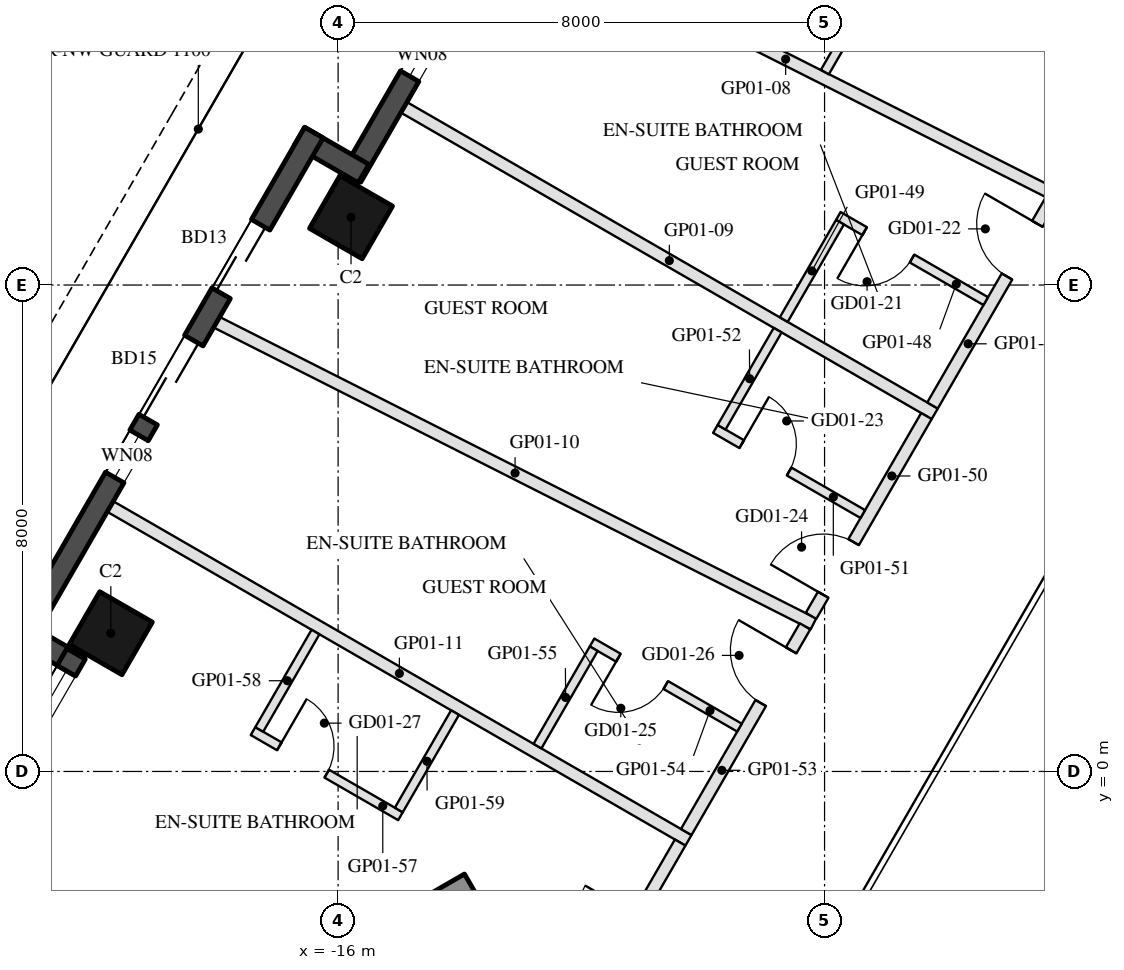
"""IFC4 building model, lengths in metres.
Left out: names, types, materials, properties, quantities, classifications, styles, units other than length and angle.
Written with IfcOpenShell. Run it as: python <this file> out.ifc"""

import sys

from ifc_helpers import new_model, si_unit, direction, frame, frame_2d, origin, origin_2d, place, context, subcontext, project, spatial, rectangle, hollow_rectangle, extrude, element, fill, save


model = new_model("IFC4")
c1 = context("Model", 3, precision=1e-05, world=origin(), true_north=direction((0.0, 1.0)))
c2 = subcontext(c1, "Body", "Model", "MODEL_VIEW")
j1 = project(units=[si_unit("LENGTHUNIT", "METRE"), si_unit("PLANEANGLEUNIT", "RADIAN")], contexts=[c1])
p1 = place(None, origin())
s1 = spatial("IfcSite", under=j1, at=p1, CompositionType="ELEMENT")
p2 = place(p1, origin())
s2 = spatial("IfcBuilding", under=s1, at=p2, CompositionType="ELEMENT")
p3 = place(p2, frame((0.0, 0.0, 46.5)))
s3 = spatial("IfcBuildingStorey", under=s2, at=p3, CompositionType="ELEMENT", Elevation=46.5)
for number, where, z_axis, x_axis in (
    (1, (-15.788, 9.115, 0.0), (0.0, 0.0, 1.0), (0.5, 0.866, 0.0)),
    (2, (-19.738, 2.273, 0.0), (0.0, 0.0, 1.0), (0.5, 0.866, 0.0)),
):
    element("IfcColumn", number, at=place(p3, frame(where, z_axis=z_axis, x_axis=x_axis)), inside=s3, PredefinedType="COLUMN", context=c2, shape_type="SweptSolid", body=[
        extrude(hollow_rectangle(XDim=1.0, YDim=1.0, WallThickness=0.045, at=origin_2d()), origin(), (0.0, 0.0, 1.0), 3.7),
    ])
p4 = place(p3, frame((-12.409, 15.617, 0.0), z_axis=(0.0, 0.0, 1.0), x_axis=(-0.500003597184, -0.866023326939, 0.0)))
e3 = element("IfcWall", 3, at=p4, inside=s3, PredefinedType="SOLIDWALL", context=c2, shape_type="SweptSolid", body=[
    extrude(rectangle(XDim=6.74, YDim=0.35, at=frame_2d((3.37, 0.0))), origin(), (0.0, 0.0, 1.0), 3.55),
])
p5 = place(p4, frame((0.32, 0.0, 0.3)))
e4 = element("IfcOpeningElement", 4, at=p5, cuts=e3, PredefinedType="OPENING", context=c2, shape_type="SweptSolid", body=[
    extrude(rectangle(XDim=1.0, YDim=2.65, at=frame_2d((0.5, 1.325))), frame((0.0, 0.185, 0.0), z_axis=(0.0, -1.0, 0.0), x_axis=(1.0, 0.0, 0.0)), (0.0, 0.0, 1.0), 0.37),
])
p6 = place(p4, frame((2.229, 0.0, 0.0)))
e5 = element("IfcOpeningElement", 5, at=p6, cuts=e3, PredefinedType="OPENING", context=c2, shape_type="SweptSolid", body=[
    extrude(rectangle(XDim=1.5, YDim=2.4, at=frame_2d((0.75, 1.2))), frame((0.0, 0.185, 0.0), z_axis=(0.0, -1.0, 0.0), x_axis=(1.0, 0.0, 0.0)), (0.0, 0.0, 1.0), 0.37),
])
p7 = place(p4, frame((4.029, 0.0, 0.3)))
e6 = element("IfcOpeningElement", 6, at=p7, cuts=e3, PredefinedType="OPENING", context=c2, shape_type="SweptSolid", body=[
    extrude(rectangle(XDim=0.8, YDim=2.65, at=frame_2d((0.4, 1.325))), frame((0.0, 0.185, 0.0), z_axis=(0.0, -1.0, 0.0), x_axis=(1.0, 0.0, 0.0)), (0.0, 0.0, 1.0), 0.37),
])
p8 = place(p3, frame((-15.581, 9.833, 0.0), z_axis=(0.0, 0.0, 1.0), x_axis=(-0.866055662726, 0.499947586314, 0.0)))
e7 = element("IfcWall", 7, at=p8, inside=s3, PredefinedType="SOLIDWALL", context=c2, shape_type="SweptSolid", body=[
    extrude(rectangle(XDim=1.22, YDim=0.35, at=frame_2d((0.61, 0.0))), origin(), (0.0, 0.0, 1.0), 3.55),
])
p9 = place(p3, frame((-16.398, 10.507, 0.0), z_axis=(0.0, 0.0, 1.0), x_axis=(-0.499999142773, -0.866025898704, 0.0)))
e8 = element("IfcWall", 8, at=p9, inside=s3, PredefinedType="SOLIDWALL", context=c2, shape_type="SweptSolid", body=[
    extrude(rectangle(XDim=9.7, YDim=0.35, at=frame_2d((4.85, 0.0))), origin(), (0.0, 0.0, 1.0), 3.55),
])
p10 = place(p9, frame((1.75, 0.0, 0.0)))
e9 = element("IfcOpeningElement", 9, at=p10, cuts=e8, PredefinedType="OPENING", context=c2, shape_type="SweptSolid", body=[
    extrude(rectangle(XDim=1.3, YDim=2.4, at=frame_2d((0.65, 1.2))), frame((0.0, 0.185, 0.0), z_axis=(0.0, -1.0, 0.0), x_axis=(1.0, 0.0, 0.0)), (0.0, 0.0, 1.0), 0.37),
])
p11 = place(p9, frame((3.95, 0.0, 0.0)))
e10 = element("IfcOpeningElement", 10, at=p11, cuts=e8, PredefinedType="OPENING", context=c2, shape_type="SweptSolid", body=[
    extrude(rectangle(XDim=1.5, YDim=2.4, at=frame_2d((0.75, 1.2))), frame((0.0, 0.185, 0.0), z_axis=(0.0, -1.0, 0.0), x_axis=(1.0, 0.0, 0.0)), (0.0, 0.0, 1.0), 0.37),
])
p12 = place(p9, frame((5.75, 0.0, 0.3)))
e11 = element("IfcOpeningElement", 11, at=p12, cuts=e8, PredefinedType="OPENING", context=c2, shape_type="SweptSolid", body=[
    extrude(rectangle(XDim=0.8, YDim=2.65, at=frame_2d((0.4, 1.325))), frame((0.0, 0.185, 0.0), z_axis=(0.0, -1.0, 0.0), x_axis=(1.0, 0.0, 0.0)), (0.0, 0.0, 1.0), 0.37),
])
p13 = place(p3, frame((-21.312, 2.346, 0.0), z_axis=(0.0, 0.0, 1.0), x_axis=(0.866005645448, -0.500034220881, 0.0)))
e12 = element("IfcWall", 12, at=p13, inside=s3, PredefinedType="SOLIDWALL", context=c2, shape_type="SweptSolid", body=[
    extrude(rectangle(XDim=1.22, YDim=0.35, at=frame_2d((0.61, 0.0))), origin(), (0.0, 0.0, 1.0), 3.55),
])
p14 = place(p3, frame((-20.309, 1.934, 0.0), z_axis=(0.0, 0.0, 1.0), x_axis=(-0.499992114976, -0.866029956157, 0.0)))
e13 = element("IfcWall", 13, at=p14, inside=s3, PredefinedType="SOLIDWALL", context=c2, shape_type="SweptSolid", body=[
    extrude(rectangle(XDim=6.74, YDim=0.35, at=frame_2d((3.37, 0.0))), origin(), (0.0, 0.0, 1.0), 3.55),
])
p15 = place(p14, frame((4.02, 0.0, 0.0)))
e14 = element("IfcOpeningElement", 14, at=p15, cuts=e13, PredefinedType="OPENING", context=c2, shape_type="SweptSolid", body=[
    extrude(rectangle(XDim=2.4, YDim=2.4, at=frame_2d((1.2, 1.2))), frame((0.0, 0.185, 0.0), z_axis=(0.0, -1.0, 0.0), x_axis=(1.0, 0.0, 0.0)), (0.0, 0.0, 1.0), 0.37),
])
p16 = place(p14, frame((0.32, 0.0, 0.3)))
e15 = element("IfcOpeningElement", 15, at=p16, cuts=e13, PredefinedType="OPENING", context=c2, shape_type="SweptSolid", body=[
    extrude(rectangle(XDim=1.5, YDim=2.65, at=frame_2d((0.75, 1.325))), frame((0.0, 0.185, 0.0), z_axis=(0.0, -1.0, 0.0), x_axis=(1.0, 0.0, 0.0)), (0.0, 0.0, 1.0), 0.37),
])
p17 = place(p14, frame((2.12, 0.0, 0.3)))
e16 = element("IfcOpeningElement", 16, at=p17, cuts=e13, PredefinedType="OPENING", context=c2, shape_type="SweptSolid", body=[
    extrude(rectangle(XDim=1.5, YDim=2.65, at=frame_2d((0.75, 1.325))), frame((0.0, 0.185, 0.0), z_axis=(0.0, -1.0, 0.0), x_axis=(1.0, 0.0, 0.0)), (0.0, 0.0, 1.0), 0.37),
])
p18 = place(p3, frame((-13.797, -1.903, 0.0), z_axis=(0.0, 0.0, 1.0), x_axis=(-0.866025009528, -0.500000682871, 0.0)))
e17 = element("IfcWall", 17, at=p18, inside=s3, PredefinedType="SHEAR", context=c2, shape_type="SweptSolid", body=[
    extrude(rectangle(XDim=14.837, YDim=0.5, at=frame_2d((7.418, 0.0))), origin(), (0.0, 0.0, 1.0), 3.5),
])
p19 = place(p3, frame((-13.147, 13.989, 0.0), z_axis=(0.0, 0.0, 1.0), x_axis=(0.892898572595, -0.450257858408, 0.0)))
e18 = element("IfcWall", 18, at=p19, inside=s3, PredefinedType="PARTITIONING", context=c2, shape_type="SweptSolid", body=[
    extrude(rectangle(XDim=10.096, YDim=0.2, at=frame_2d((5.048, 0.0))), origin(), (0.0, 0.0, 1.0), 2.96),
])
p20 = place(p3, frame((-14.917, 10.922, 0.0), z_axis=(0.0, 0.0, 1.0), x_axis=(0.866022637375, -0.500004791531, 0.0)))
e19 = element("IfcWall", 19, at=p20, inside=s3, PredefinedType="PARTITIONING", context=c2, shape_type="SweptSolid", body=[
    extrude(rectangle(XDim=10.08, YDim=0.2, at=frame_2d((5.04, 0.0))), origin(), (0.0, 0.0, 1.0), 2.96),
])
p21 = place(p3, frame((-17.997, 7.388, 0.0), z_axis=(0.0, 0.0, 1.0), x_axis=(0.892478457214, -0.451090016968, 0.0)))
e20 = element("IfcWall", 20, at=p21, inside=s3, PredefinedType="PARTITIONING", context=c2, shape_type="SweptSolid", body=[
    extrude(rectangle(XDim=10.997, YDim=0.2, at=frame_2d((5.499, 0.0))), origin(), (0.0, 0.0, 1.0), 2.96),
])
p22 = place(p3, frame((-19.747, 4.357, 0.0), z_axis=(0.0, 0.0, 1.0), x_axis=(0.866027479907, -0.499996404033, 0.0)))
e21 = element("IfcWall", 21, at=p22, inside=s3, PredefinedType="PARTITIONING", context=c2, shape_type="SweptSolid", body=[
    extrude(rectangle(XDim=10.98, YDim=0.2, at=frame_2d((5.49, 0.0))), origin(), (0.0, 0.0, 1.0), 2.96),
])
p23 = place(p3, frame((-7.068, 13.108, 0.0), z_axis=(0.0, 0.0, 1.0), x_axis=(-0.4999770169, -0.866038672677, 0.0)))
e22 = element("IfcWall", 22, at=p23, inside=s3, PredefinedType="PARTITIONING", context=c2, shape_type="SweptSolid", body=[
    extrude(rectangle(XDim=1.854, YDim=0.15, at=frame_2d((0.927, 0.0))), origin(), (0.0, 0.0, 1.0), 2.95),
])
p24 = place(p3, frame((-6.225, 6.019, 0.0), z_axis=(0.0, 0.0, 1.0), x_axis=(0.499998439657, 0.866026304647, 0.0)))
e23 = element("IfcWall", 23, at=p24, inside=s3, PredefinedType="PARTITIONING", context=c2, shape_type="SweptSolid", body=[
    extrude(rectangle(XDim=3.905, YDim=0.2, at=frame_2d((1.953, 0.0))), origin(), (0.0, 0.0, 1.0), 2.95),
])
p25 = place(p24, frame((2.45, 0.0, 0.0)))
e24 = element("IfcOpeningElement", 24, at=p25, cuts=e23, PredefinedType="OPENING", context=c2, shape_type="SweptSolid", body=[
    extrude(rectangle(XDim=1.0, YDim=2.1, at=frame_2d((0.5, 1.05))), frame((0.0, 0.11, 0.0), z_axis=(0.0, -1.0, 0.0), x_axis=(1.0, 0.0, 0.0)), (0.0, 0.0, 1.0), 0.22),
])
p26 = place(p3, frame((-5.349, 7.736, 0.0), z_axis=(0.0, 0.0, 1.0), x_axis=(-0.866056369097, 0.49994636267, 0.0)))
e25 = element("IfcWall", 25, at=p26, inside=s3, PredefinedType="PARTITIONING", context=c2, shape_type="SweptSolid", body=[
    extrude(rectangle(XDim=2.8, YDim=0.15, at=frame_2d((1.4, 0.0))), origin(), (0.0, 0.0, 1.0), 2.95),
])
p27 = place(p26, frame((1.4, 0.0, 0.0)))
e26 = element("IfcOpeningElement", 26, at=p27, cuts=e25, PredefinedType="OPENING", context=c2, shape_type="SweptSolid", body=[
    extrude(rectangle(XDim=0.9, YDim=2.1, at=frame_2d((0.45, 1.05))), frame((0.0, 0.085, 0.0), z_axis=(0.0, -1.0, 0.0), x_axis=(1.0, 0.0, 0.0)), (0.0, 0.0, 1.0), 0.17),
])
p28 = place(p3, frame((-7.746, 9.033, 0.0), z_axis=(0.0, 0.0, 1.0), x_axis=(-0.500042316284, -0.866000971088, 0.0)))
e27 = element("IfcWall", 27, at=p28, inside=s3, PredefinedType="PARTITIONING", context=c2, shape_type="SweptSolid", body=[
    extrude(rectangle(XDim=1.85, YDim=0.15, at=frame_2d((0.925, 0.0))), origin(), (0.0, 0.0, 1.0), 2.95),
])
p29 = place(p3, frame((-8.222, 2.56, 0.0), z_axis=(0.0, 0.0, 1.0), x_axis=(0.499973105789, 0.866040930607, 0.0)))
e28 = element("IfcWall", 28, at=p29, inside=s3, PredefinedType="PARTITIONING", context=c2, shape_type="SweptSolid", body=[
    extrude(rectangle(XDim=3.794, YDim=0.2, at=frame_2d((1.897, 0.0))), origin(), (0.0, 0.0, 1.0), 2.95),
])
p30 = place(p29, frame((0.4, 0.0, 0.0)))
e29 = element("IfcOpeningElement", 29, at=p30, cuts=e28, PredefinedType="OPENING", context=c2, shape_type="SweptSolid", body=[
    extrude(rectangle(XDim=1.0, YDim=2.1, at=frame_2d((0.5, 1.05))), frame((0.0, 0.11, 0.0), z_axis=(0.0, -1.0, 0.0), x_axis=(1.0, 0.0, 0.0)), (0.0, 0.0, 1.0), 0.22),
])
p31 = place(p3, frame((-9.796, 5.633, 0.0), z_axis=(0.0, 0.0, 1.0), x_axis=(0.866034573852, -0.49998411664, 0.0)))
e30 = element("IfcWall", 30, at=p31, inside=s3, PredefinedType="PARTITIONING", context=c2, shape_type="SweptSolid", body=[
    extrude(rectangle(XDim=2.8, YDim=0.15, at=frame_2d((1.4, 0.0))), origin(), (0.0, 0.0, 1.0), 2.95),
])
p32 = place(p31, frame((0.5, 0.0, 0.0)))
e31 = element("IfcOpeningElement", 31, at=p32, cuts=e30, PredefinedType="OPENING", context=c2, shape_type="SweptSolid", body=[
    extrude(rectangle(XDim=0.9, YDim=2.1, at=frame_2d((0.45, 1.05))), frame((0.0, 0.085, 0.0), z_axis=(0.0, -1.0, 0.0), x_axis=(1.0, 0.0, 0.0)), (0.0, 0.0, 1.0), 0.17),
])
p33 = place(p3, frame((-8.771, 7.258, 0.0), z_axis=(0.0, 0.0, 1.0), x_axis=(-0.500154078321, -0.865936428347, 0.0)))
e32 = element("IfcWall", 32, at=p33, inside=s3, PredefinedType="PARTITIONING", context=c2, shape_type="SweptSolid", body=[
    extrude(rectangle(XDim=1.844, YDim=0.15, at=frame_2d((0.922, 0.0))), origin(), (0.0, 0.0, 1.0), 2.95),
])
p34 = place(p3, frame((-10.275, -0.996, 0.0), z_axis=(0.0, 0.0, 1.0), x_axis=(0.499998439657, 0.866026304647, 0.0)))
e33 = element("IfcWall", 33, at=p34, inside=s3, PredefinedType="PARTITIONING", context=c2, shape_type="SweptSolid", body=[
    extrude(rectangle(XDim=3.905, YDim=0.2, at=frame_2d((1.953, 0.0))), origin(), (0.0, 0.0, 1.0), 2.95),
])
p35 = place(p34, frame((2.45, 0.0, 0.0)))
e34 = element("IfcOpeningElement", 34, at=p35, cuts=e33, PredefinedType="OPENING", context=c2, shape_type="SweptSolid", body=[
    extrude(rectangle(XDim=1.0, YDim=2.1, at=frame_2d((0.5, 1.05))), frame((0.0, 0.11, 0.0), z_axis=(0.0, -1.0, 0.0), x_axis=(1.0, 0.0, 0.0)), (0.0, 0.0, 1.0), 0.22),
])
p36 = place(p3, frame((-9.399, 0.721, 0.0), z_axis=(0.0, 0.0, 1.0), x_axis=(-0.866034573852, 0.49998411664, 0.0)))
e35 = element("IfcWall", 35, at=p36, inside=s3, PredefinedType="PARTITIONING", context=c2, shape_type="SweptSolid", body=[
    extrude(rectangle(XDim=2.8, YDim=0.15, at=frame_2d((1.4, 0.0))), origin(), (0.0, 0.0, 1.0), 2.95),
])
p37 = place(p36, frame((1.4, 0.0, 0.0)))
e36 = element("IfcOpeningElement", 36, at=p37, cuts=e35, PredefinedType="OPENING", context=c2, shape_type="SweptSolid", body=[
    extrude(rectangle(XDim=0.9, YDim=2.1, at=frame_2d((0.45, 1.05))), frame((0.0, 0.085, 0.0), z_axis=(0.0, -1.0, 0.0), x_axis=(1.0, 0.0, 0.0)), (0.0, 0.0, 1.0), 0.17),
])
p38 = place(p3, frame((-11.796, 2.019, 0.0), z_axis=(0.0, 0.0, 1.0), x_axis=(-0.499985172903, -0.866033964044, 0.0)))
e37 = element("IfcWall", 37, at=p38, inside=s3, PredefinedType="PARTITIONING", context=c2, shape_type="SweptSolid", body=[
    extrude(rectangle(XDim=1.85, YDim=0.15, at=frame_2d((0.925, 0.0))), origin(), (0.0, 0.0, 1.0), 3.55),
])
p39 = place(p3, frame((-12.269, -4.45, 0.0), z_axis=(0.0, 0.0, 1.0), x_axis=(0.500055316652, 0.865993464345, 0.0)))
e38 = element("IfcWall", 38, at=p39, inside=s3, PredefinedType="PARTITIONING", context=c2, shape_type="SweptSolid", body=[
    extrude(rectangle(XDim=3.788, YDim=0.2, at=frame_2d((1.894, 0.0))), origin(), (0.0, 0.0, 1.0), 2.95),
])
p40 = place(p39, frame((1.394, 0.0, 0.0)))
e39 = element("IfcOpeningElement", 39, at=p40, cuts=e38, PredefinedType="OPENING", context=c2, shape_type="SweptSolid", body=[
    extrude(rectangle(XDim=1.0, YDim=2.1, at=frame_2d((0.5, 1.05))), frame((0.0, 0.11, 0.0), z_axis=(0.0, -1.0, 0.0), x_axis=(1.0, 0.0, 0.0)), (0.0, 0.0, 1.0), 0.22),
])
p41 = place(p3, frame((-17.399, 0.664, 0.0), z_axis=(0.0, 0.0, 1.0), x_axis=(0.866018616679, -0.500011755427, 0.0)))
e40 = element("IfcWall", 40, at=p41, inside=s3, PredefinedType="PARTITIONING", context=c2, shape_type="SweptSolid", body=[
    extrude(rectangle(XDim=2.8, YDim=0.15, at=frame_2d((1.4, 0.0))), origin(), (0.0, 0.0, 1.0), 3.55),
])
p42 = place(p41, frame((0.5, 0.0, 0.0)))
e41 = element("IfcOpeningElement", 41, at=p42, cuts=e40, PredefinedType="OPENING", context=c2, shape_type="SweptSolid", body=[
    extrude(rectangle(XDim=0.9, YDim=2.1, at=frame_2d((0.45, 1.05))), frame((0.0, 0.085, 0.0), z_axis=(0.0, -1.0, 0.0), x_axis=(1.0, 0.0, 0.0)), (0.0, 0.0, 1.0), 0.17),
])
p43 = place(p3, frame((-16.372, 2.293, 0.0), z_axis=(0.0, 0.0, 1.0), x_axis=(-0.499985172903, -0.866033964044, 0.0)))
e42 = element("IfcWall", 42, at=p43, inside=s3, PredefinedType="PARTITIONING", context=c2, shape_type="SweptSolid", body=[
    extrude(rectangle(XDim=1.85, YDim=0.15, at=frame_2d((0.925, 0.0))), origin(), (0.0, 0.0, 1.0), 2.95),
])
p44 = place(p3, frame((-14.077, 0.968, 0.0), z_axis=(0.0, 0.0, 1.0), x_axis=(-0.500042316284, -0.866000971088, 0.0)))
e43 = element("IfcWall", 43, at=p44, inside=s3, PredefinedType="PARTITIONING", context=c2, shape_type="SweptSolid", body=[
    extrude(rectangle(XDim=1.85, YDim=0.15, at=frame_2d((0.925, 0.0))), origin(), (0.0, 0.0, 1.0), 2.95),
])
p45 = place(p7, origin())
e44 = element("IfcWindow", 44, at=p45, inside=s3, PartitioningType="SINGLE_PANEL", PredefinedType="WINDOW", context=c2, shape_type="SweptSolid", body=[
    extrude(rectangle(XDim=0.8, YDim=2.65, at=frame_2d((0.4, 1.325))), frame((0.0, 0.03, 0.0), z_axis=(0.0, -1.0, 0.0), x_axis=(1.0, 0.0, 0.0)), (0.0, 0.0, 1.0), 0.06),
])
fill(e6, e44)
p46 = place(p10, frame((1.3, 0.0, 0.0), z_axis=(0.0, 0.0, 1.0), x_axis=(-1.0, 0.0, 0.0)))
e45 = element("IfcDoor", 45, at=p46, inside=s3, OperationType="SLIDING_TO_LEFT", PredefinedType="DOOR", context=c2, shape_type="SweptSolid", body=[
    extrude(rectangle(XDim=1.3, YDim=2.4, at=frame_2d((0.65, 1.2))), frame((0.0, 0.025, 0.0), z_axis=(0.0, -1.0, 0.0), x_axis=(1.0, 0.0, 0.0)), (0.0, 0.0, 1.0), 0.05),
])
fill(e9, e45)
p47 = place(p11, frame((1.5, 0.0, 0.0), z_axis=(0.0, 0.0, 1.0), x_axis=(-1.0, 0.0, 0.0)))
e46 = element("IfcDoor", 46, at=p47, inside=s3, OperationType="SLIDING_TO_LEFT", PredefinedType="DOOR", context=c2, shape_type="SweptSolid", body=[
    extrude(rectangle(XDim=1.5, YDim=2.4, at=frame_2d((0.75, 1.2))), frame((0.0, 0.025, 0.0), z_axis=(0.0, -1.0, 0.0), x_axis=(1.0, 0.0, 0.0)), (0.0, 0.0, 1.0), 0.05),
])
fill(e10, e46)
p48 = place(p12, origin())
e47 = element("IfcWindow", 47, at=p48, inside=s3, PartitioningType="SINGLE_PANEL", PredefinedType="WINDOW", context=c2, shape_type="SweptSolid", body=[
    extrude(rectangle(XDim=0.8, YDim=2.65, at=frame_2d((0.4, 1.325))), frame((0.0, 0.03, 0.0), z_axis=(0.0, -1.0, 0.0), x_axis=(1.0, 0.0, 0.0)), (0.0, 0.0, 1.0), 0.06),
])
fill(e11, e47)
p49 = place(p16, origin())
e48 = element("IfcWindow", 48, at=p49, inside=s3, PartitioningType="SINGLE_PANEL", PredefinedType="WINDOW", context=c2, shape_type="SweptSolid", body=[
    extrude(rectangle(XDim=1.5, YDim=2.65, at=frame_2d((0.75, 1.325))), frame((0.0, 0.03, 0.0), z_axis=(0.0, -1.0, 0.0), x_axis=(1.0, 0.0, 0.0)), (0.0, 0.0, 1.0), 0.06),
])
fill(e15, e48)
p50 = place(p27, origin())
e49 = element("IfcDoor", 49, at=p50, inside=s3, OperationType="SINGLE_SWING_RIGHT", PredefinedType="DOOR", context=c2, shape_type="SweptSolid", body=[
    extrude(rectangle(XDim=0.9, YDim=2.1, at=frame_2d((0.45, 1.05))), frame((0.0, 0.025, 0.0), z_axis=(0.0, -1.0, 0.0), x_axis=(1.0, 0.0, 0.0)), (0.0, 0.0, 1.0), 0.05),
])
fill(e26, e49)
p51 = place(p25, origin())
e50 = element("IfcDoor", 50, at=p51, inside=s3, OperationType="SINGLE_SWING_RIGHT", PredefinedType="DOOR", context=c2, shape_type="SweptSolid", body=[
    extrude(rectangle(XDim=1.0, YDim=2.1, at=frame_2d((0.5, 1.05))), frame((0.0, 0.025, 0.0), z_axis=(0.0, -1.0, 0.0), x_axis=(1.0, 0.0, 0.0)), (0.0, 0.0, 1.0), 0.05),
])
fill(e24, e50)
p52 = place(p32, origin())
e51 = element("IfcDoor", 51, at=p52, inside=s3, OperationType="SINGLE_SWING_LEFT", PredefinedType="DOOR", context=c2, shape_type="SweptSolid", body=[
    extrude(rectangle(XDim=0.9, YDim=2.1, at=frame_2d((0.45, 1.05))), frame((0.0, 0.025, 0.0), z_axis=(0.0, -1.0, 0.0), x_axis=(1.0, 0.0, 0.0)), (0.0, 0.0, 1.0), 0.05),
])
fill(e31, e51)
p53 = place(p30, origin())
e52 = element("IfcDoor", 52, at=p53, inside=s3, OperationType="SINGLE_SWING_LEFT", PredefinedType="DOOR", context=c2, shape_type="SweptSolid", body=[
    extrude(rectangle(XDim=1.0, YDim=2.1, at=frame_2d((0.5, 1.05))), frame((0.0, 0.025, 0.0), z_axis=(0.0, -1.0, 0.0), x_axis=(1.0, 0.0, 0.0)), (0.0, 0.0, 1.0), 0.05),
])
fill(e29, e52)
p54 = place(p37, origin())
e53 = element("IfcDoor", 53, at=p54, inside=s3, OperationType="SINGLE_SWING_RIGHT", PredefinedType="DOOR", context=c2, shape_type="SweptSolid", body=[
    extrude(rectangle(XDim=0.9, YDim=2.1, at=frame_2d((0.45, 1.05))), frame((0.0, 0.025, 0.0), z_axis=(0.0, -1.0, 0.0), x_axis=(1.0, 0.0, 0.0)), (0.0, 0.0, 1.0), 0.05),
])
fill(e36, e53)
p55 = place(p35, origin())
e54 = element("IfcDoor", 54, at=p55, inside=s3, OperationType="SINGLE_SWING_RIGHT", PredefinedType="DOOR", context=c2, shape_type="SweptSolid", body=[
    extrude(rectangle(XDim=1.0, YDim=2.1, at=frame_2d((0.5, 1.05))), frame((0.0, 0.025, 0.0), z_axis=(0.0, -1.0, 0.0), x_axis=(1.0, 0.0, 0.0)), (0.0, 0.0, 1.0), 0.05),
])
fill(e34, e54)
p56 = place(p42, origin())
e55 = element("IfcDoor", 55, at=p56, inside=s3, OperationType="SINGLE_SWING_LEFT", PredefinedType="DOOR", context=c2, shape_type="SweptSolid", body=[
    extrude(rectangle(XDim=0.9, YDim=2.1, at=frame_2d((0.45, 1.05))), frame((0.0, 0.025, 0.0), z_axis=(0.0, -1.0, 0.0), x_axis=(1.0, 0.0, 0.0)), (0.0, 0.0, 1.0), 0.05),
])
fill(e41, e55)
save(model, sys.argv[1])
